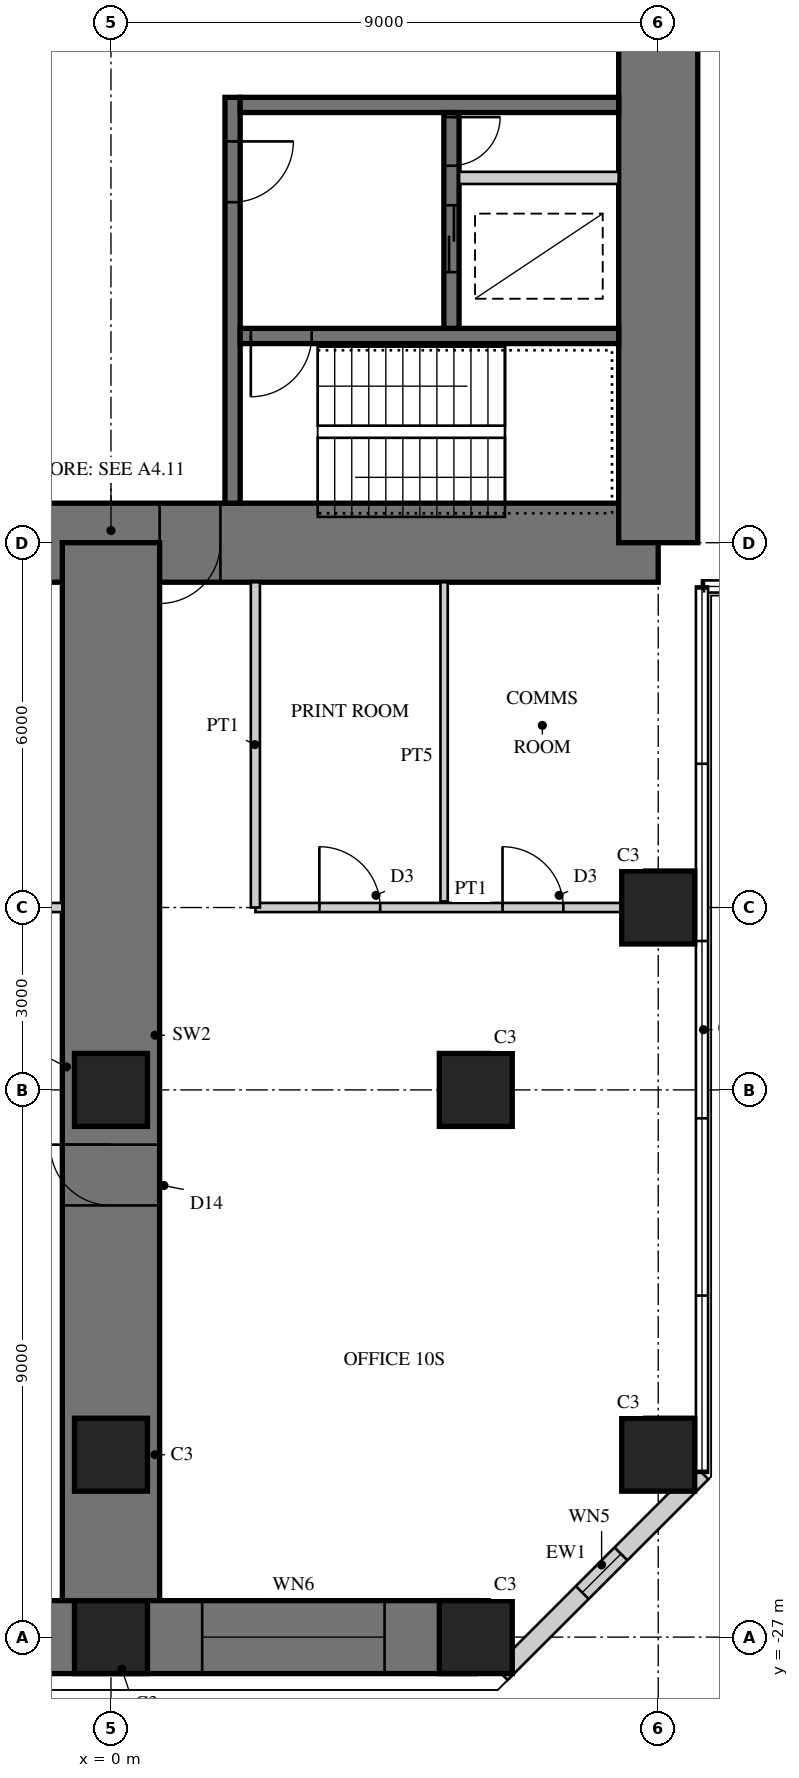
"""IFC4 building model, lengths in metres.
Left out: names, types, materials, properties, quantities, classifications, styles, units other than length and angle.
Written with IfcOpenShell. Run it as: python <this file> out.ifc"""

import sys

from ifc_helpers import new_model, si_unit, direction, frame, frame_2d, origin, origin_2d, place, context, subcontext, project, spatial, rectangle, hollow_rectangle, extrude, element, fill, save


model = new_model("IFC4")
c1 = context("Model", 3, precision=1e-05, world=origin(), true_north=direction((0.0, 1.0)))
c2 = subcontext(c1, "Body", "Model", "MODEL_VIEW")
j1 = project(units=[si_unit("LENGTHUNIT", "METRE"), si_unit("PLANEANGLEUNIT", "RADIAN")], contexts=[c1])
p1 = place(None, origin())
s1 = spatial("IfcSite", under=j1, at=p1, CompositionType="ELEMENT")
p2 = place(p1, origin())
s2 = spatial("IfcBuilding", under=s1, at=p2, CompositionType="ELEMENT")
p3 = place(p2, frame((0.0, 0.0, 43.5)))
s3 = spatial("IfcBuildingStorey", under=s2, at=p3, CompositionType="ELEMENT", Elevation=43.5)
p4 = place(p3, frame((-9.0, -9.0, 0.0), z_axis=(0.0, 0.0, 1.0), x_axis=(1.0, 0.0, 0.0)))
e1 = element("IfcWall", 1, at=p4, inside=s3, PredefinedType="SHEAR", context=c2, shape_type="SweptSolid", body=[
    extrude(rectangle(XDim=18.0, YDim=1.3, at=frame_2d((9.0, 0.0))), origin(), (0.0, 0.0, 1.0), 4.0),
])
p5 = place(p4, frame((9.8, 0.0, 0.0)))
e2 = element("IfcOpeningElement", 2, at=p5, cuts=e1, PredefinedType="OPENING", context=c2, shape_type="SweptSolid", body=[
    extrude(rectangle(XDim=1.0, YDim=2.4, at=frame_2d((0.5, 1.2))), frame((0.0, 0.66, 0.0), z_axis=(0.0, -1.0, 0.0), x_axis=(1.0, 0.0, 0.0)), (0.0, 0.0, 1.0), 1.32),
])
p6 = place(p3, frame((9.0, -9.0, 0.0), z_axis=(0.0, 0.0, 1.0), x_axis=(0.0, 1.0, 0.0)))
e3 = element("IfcWall", 3, at=p6, inside=s3, PredefinedType="SHEAR", context=c2, shape_type="SweptSolid", body=[
    extrude(rectangle(XDim=18.0, YDim=1.3, at=frame_2d((9.0, 0.0))), origin(), (0.0, 0.0, 1.0), 4.0),
])
p7 = place(p6, frame((9.8, 0.0, 0.0)))
e4 = element("IfcOpeningElement", 4, at=p7, cuts=e3, PredefinedType="OPENING", context=c2, shape_type="SweptSolid", body=[
    extrude(rectangle(XDim=1.0, YDim=2.4, at=frame_2d((0.5, 1.2))), frame((0.0, 0.66, 0.0), z_axis=(0.0, -1.0, 0.0), x_axis=(1.0, 0.0, 0.0)), (0.0, 0.0, 1.0), 1.32),
])
p8 = place(p3, frame((2.0, -1.675, 0.0), z_axis=(0.0, 0.0, 1.0), x_axis=(0.0, -1.0, 0.0)))
e5 = element("IfcWall", 5, at=p8, inside=s3, PredefinedType="SHEAR", context=c2, shape_type="SweptSolid", body=[
    extrude(rectangle(XDim=6.675, YDim=0.25, at=frame_2d((3.337, 0.0))), origin(), (0.0, 0.0, 1.0), 4.0),
])
p9 = place(p8, frame((0.725, 0.0, 0.0)))
e6 = element("IfcOpeningElement", 6, at=p9, cuts=e5, PredefinedType="OPENING", context=c2, shape_type="SweptSolid", body=[
    extrude(rectangle(XDim=1.0, YDim=2.1, at=frame_2d((0.5, 1.05))), frame((0.0, 0.135, 0.0), z_axis=(0.0, -1.0, 0.0), x_axis=(1.0, 0.0, 0.0)), (0.0, 0.0, 1.0), 0.27),
])
p10 = place(p3, frame((2.125, -1.8, 0.0), z_axis=(0.0, 0.0, 1.0), x_axis=(1.0, 0.0, 0.0)))
e7 = element("IfcWall", 7, at=p10, inside=s3, PredefinedType="SHEAR", context=c2, shape_type="SweptSolid", body=[
    extrude(rectangle(XDim=6.225, YDim=0.25, at=frame_2d((3.113, 0.0))), origin(), (0.0, 0.0, 1.0), 4.0),
])
p11 = place(p3, frame((2.125, -5.6, 0.0), z_axis=(0.0, 0.0, 1.0), x_axis=(1.0, 0.0, 0.0)))
e8 = element("IfcWall", 8, at=p11, inside=s3, PredefinedType="SHEAR", context=c2, shape_type="SweptSolid", body=[
    extrude(rectangle(XDim=6.225, YDim=0.25, at=frame_2d((3.113, 0.0))), origin(), (0.0, 0.0, 1.0), 4.0),
])
p12 = place(p11, frame((0.175, 0.0, 0.0)))
e9 = element("IfcOpeningElement", 9, at=p12, cuts=e8, PredefinedType="OPENING", context=c2, shape_type="SweptSolid", body=[
    extrude(rectangle(XDim=1.0, YDim=2.1, at=frame_2d((0.5, 1.05))), frame((0.0, 0.135, 0.0), z_axis=(0.0, -1.0, 0.0), x_axis=(1.0, 0.0, 0.0)), (0.0, 0.0, 1.0), 0.27),
])
p13 = place(p3, frame((5.6, -1.925, 0.0), z_axis=(0.0, 0.0, 1.0), x_axis=(0.0, -1.0, 0.0)))
e10 = element("IfcWall", 10, at=p13, inside=s3, PredefinedType="SHEAR", context=c2, shape_type="SweptSolid", body=[
    extrude(rectangle(XDim=3.55, YDim=0.25, at=frame_2d((1.775, 0.0))), origin(), (0.0, 0.0, 1.0), 4.0),
])
p14 = place(p13, frame((1.525, 0.0, 0.0)))
e11 = element("IfcOpeningElement", 11, at=p14, cuts=e10, PredefinedType="OPENING", context=c2, shape_type="SweptSolid", body=[
    extrude(rectangle(XDim=1.1, YDim=2.2, at=frame_2d((0.55, 1.1))), frame((0.0, 0.135, 0.0), z_axis=(0.0, -1.0, 0.0), x_axis=(1.0, 0.0, 0.0)), (0.0, 0.0, 1.0), 0.27),
])
p15 = place(p13, frame((0.075, 0.0, 0.0)))
e12 = element("IfcOpeningElement", 12, at=p15, cuts=e10, PredefinedType="OPENING", context=c2, shape_type="SweptSolid", body=[
    extrude(rectangle(XDim=0.8, YDim=2.1, at=frame_2d((0.4, 1.05))), frame((0.0, 0.135, 0.0), z_axis=(0.0, -1.0, 0.0), x_axis=(1.0, 0.0, 0.0)), (0.0, 0.0, 1.0), 0.27),
])
p16 = place(p3, frame((5.725, -3.0, 0.0), z_axis=(0.0, 0.0, 1.0), x_axis=(1.0, 0.0, 0.0)))
e13 = element("IfcWall", 13, at=p16, inside=s3, PredefinedType="PARTITIONING", context=c2, shape_type="SweptSolid", body=[
    extrude(rectangle(XDim=2.625, YDim=0.2, at=frame_2d((1.312, 0.0))), origin(), (0.0, 0.0, 1.0), 4.0),
])
p17 = place(p3, frame((0.0, -9.0, 0.0), z_axis=(0.0, 0.0, 1.0), x_axis=(0.0, -1.0, 0.0)))
e14 = element("IfcWall", 14, at=p17, inside=s3, PredefinedType="SHEAR", context=c2, shape_type="SweptSolid", body=[
    extrude(rectangle(XDim=18.0, YDim=1.6, at=frame_2d((9.0, 0.0))), origin(), (0.0, 0.0, 1.0), 4.0),
])
p18 = place(p17, frame((9.9, 0.0, 0.0)))
e15 = element("IfcOpeningElement", 15, at=p18, cuts=e14, PredefinedType="OPENING", context=c2, shape_type="SweptSolid", body=[
    extrude(rectangle(XDim=1.0, YDim=2.2, at=frame_2d((0.5, 1.1))), frame((0.0, 0.81, 0.0), z_axis=(0.0, -1.0, 0.0), x_axis=(1.0, 0.0, 0.0)), (0.0, 0.0, 1.0), 1.62),
])
p19 = place(p3, frame((-6.0, -27.0, 0.0), z_axis=(0.0, 0.0, 1.0), x_axis=(1.0, 0.0, 0.0)))
e16 = element("IfcWall", 16, at=p19, inside=s3, PredefinedType="SHEAR", context=c2, shape_type="SweptSolid", body=[
    extrude(rectangle(XDim=12.0, YDim=1.2, at=frame_2d((6.0, 0.0))), origin(), (0.0, 0.0, 1.0), 4.0),
])
p20 = place(p19, frame((1.5, 0.0, 0.6)))
e17 = element("IfcOpeningElement", 17, at=p20, cuts=e16, PredefinedType="OPENING", context=c2, shape_type="SweptSolid", body=[
    extrude(rectangle(XDim=3.0, YDim=2.4, at=frame_2d((1.5, 1.2))), frame((0.0, 0.61, 0.0), z_axis=(0.0, -1.0, 0.0), x_axis=(1.0, 0.0, 0.0)), (0.0, 0.0, 1.0), 1.22),
])
p21 = place(p19, frame((7.5, 0.0, 0.6)))
e18 = element("IfcOpeningElement", 18, at=p21, cuts=e16, PredefinedType="OPENING", context=c2, shape_type="SweptSolid", body=[
    extrude(rectangle(XDim=3.0, YDim=2.4, at=frame_2d((1.5, 1.2))), frame((0.0, 0.61, 0.0), z_axis=(0.0, -1.0, 0.0), x_axis=(1.0, 0.0, 0.0)), (0.0, 0.0, 1.0), 1.22),
])
for number, where, z_axis, x_axis in (
    (19, (9.0, -15.0, 0.0), (0.0, 0.0, 1.0), (1.0, 0.0, 0.0)),
    (20, (9.0, -24.0, 0.0), (0.0, 0.0, 1.0), (1.0, 0.0, 0.0)),
    (21, (0.0, -27.0, 0.0), (0.0, 0.0, 1.0), (1.0, 0.0, 0.0)),
    (22, (6.0, -27.0, 0.0), (0.0, 0.0, 1.0), (1.0, 0.0, 0.0)),
    (23, (0.0, -18.0, 0.0), (0.0, 0.0, 1.0), (1.0, 0.0, 0.0)),
    (24, (6.0, -18.0, 0.0), (0.0, 0.0, 1.0), (1.0, 0.0, 0.0)),
    (25, (0.0, -24.0, 0.0), (0.0, 0.0, 1.0), (1.0, 0.0, 0.0)),
):
    element("IfcColumn", number, at=place(p3, frame(where, z_axis=z_axis, x_axis=x_axis)), inside=s3, PredefinedType="COLUMN", context=c2, shape_type="SweptSolid", body=[
        extrude(rectangle(XDim=1.2, YDim=1.2, at=origin_2d()), origin(), (0.0, 0.0, 1.0), 4.0),
    ])
p22 = place(p3, frame((6.418, -27.6, 0.0), z_axis=(0.0, 0.0, 1.0), x_axis=(0.707106781187, 0.707106781187, 0.0)))
e26 = element("IfcWall", 26, at=p22, inside=s3, PredefinedType="SOLIDWALL", context=c2, shape_type="SweptSolid", body=[
    extrude(rectangle(XDim=4.669, YDim=0.3, at=frame_2d((2.335, 0.0))), origin(), (0.0, 0.0, 1.0), 3.8),
])
p23 = place(p22, frame((1.885, 0.0, 0.3)))
e27 = element("IfcOpeningElement", 27, at=p23, cuts=e26, PredefinedType="OPENING", context=c2, shape_type="SweptSolid", body=[
    extrude(rectangle(XDim=0.9, YDim=2.4, at=frame_2d((0.45, 1.2))), frame((0.0, 0.16, 0.0), z_axis=(0.0, -1.0, 0.0), x_axis=(1.0, 0.0, 0.0)), (0.0, 0.0, 1.0), 0.32),
])
p24 = place(p3, frame((2.375, -15.0, 0.0), z_axis=(0.0, 0.0, 1.0), x_axis=(1.0, 0.0, 0.0)))
e28 = element("IfcWall", 28, at=p24, inside=s3, PredefinedType="PARTITIONING", context=c2, shape_type="SweptSolid", body=[
    extrude(rectangle(XDim=6.025, YDim=0.15, at=frame_2d((3.012, 0.0))), origin(), (0.0, 0.0, 1.0), 2.95),
])
p25 = place(p24, frame((1.052, 0.0, 0.0)))
e29 = element("IfcOpeningElement", 29, at=p25, cuts=e28, PredefinedType="OPENING", context=c2, shape_type="SweptSolid", body=[
    extrude(rectangle(XDim=1.0, YDim=2.1, at=frame_2d((0.5, 1.05))), frame((0.0, 0.085, 0.0), z_axis=(0.0, -1.0, 0.0), x_axis=(1.0, 0.0, 0.0)), (0.0, 0.0, 1.0), 0.17),
])
p26 = place(p24, frame((4.064, 0.0, 0.0)))
e30 = element("IfcOpeningElement", 30, at=p26, cuts=e28, PredefinedType="OPENING", context=c2, shape_type="SweptSolid", body=[
    extrude(rectangle(XDim=1.0, YDim=2.1, at=frame_2d((0.5, 1.05))), frame((0.0, 0.085, 0.0), z_axis=(0.0, -1.0, 0.0), x_axis=(1.0, 0.0, 0.0)), (0.0, 0.0, 1.0), 0.17),
])
p27 = place(p3, frame((2.375, -9.65, 0.0), z_axis=(0.0, 0.0, 1.0), x_axis=(0.0, -1.0, 0.0)))
e31 = element("IfcWall", 31, at=p27, inside=s3, PredefinedType="PARTITIONING", context=c2, shape_type="SweptSolid", body=[
    extrude(rectangle(XDim=5.35, YDim=0.15, at=frame_2d((2.675, 0.0))), origin(), (0.0, 0.0, 1.0), 3.8),
])
p28 = place(p3, frame((5.479, -9.65, 0.0), z_axis=(0.0, 0.0, 1.0), x_axis=(0.0, -1.0, 0.0)))
e32 = element("IfcWall", 32, at=p28, inside=s3, PredefinedType="PLUMBINGWALL", context=c2, shape_type="SweptSolid", body=[
    extrude(rectangle(XDim=5.25, YDim=0.12, at=frame_2d((2.625, 0.0))), origin(), (0.0, 0.0, 1.0), 3.8),
])
p29 = place(p3, frame((-8.4, -15.0, 0.0), z_axis=(0.0, 0.0, 1.0), x_axis=(1.0, 0.0, 0.0)))
e33 = element("IfcWall", 33, at=p29, inside=s3, PredefinedType="PARTITIONING", context=c2, shape_type="SweptSolid", body=[
    extrude(rectangle(XDim=7.6, YDim=0.15, at=frame_2d((3.8, 0.0))), origin(), (0.0, 0.0, 1.0), 2.95),
])
p30 = place(p29, frame((1.375, 0.0, 0.0)))
e34 = element("IfcOpeningElement", 34, at=p30, cuts=e33, PredefinedType="OPENING", context=c2, shape_type="SweptSolid", body=[
    extrude(rectangle(XDim=1.0, YDim=2.1, at=frame_2d((0.5, 1.05))), frame((0.0, 0.085, 0.0), z_axis=(0.0, -1.0, 0.0), x_axis=(1.0, 0.0, 0.0)), (0.0, 0.0, 1.0), 0.17),
])
p31 = place(p29, frame((5.175, 0.0, 0.0)))
e35 = element("IfcOpeningElement", 35, at=p31, cuts=e33, PredefinedType="OPENING", context=c2, shape_type="SweptSolid", body=[
    extrude(rectangle(XDim=1.0, YDim=2.1, at=frame_2d((0.5, 1.05))), frame((0.0, 0.085, 0.0), z_axis=(0.0, -1.0, 0.0), x_axis=(1.0, 0.0, 0.0)), (0.0, 0.0, 1.0), 0.17),
])
p32 = place(p21, origin())
e36 = element("IfcWindow", 36, at=p32, inside=s3, PartitioningType="SINGLE_PANEL", PredefinedType="WINDOW", context=c2, shape_type="SweptSolid", body=[
    extrude(hollow_rectangle(XDim=3.0, YDim=2.4, WallThickness=0.06, at=frame_2d((1.5, 1.2))), frame((0.0, 0.03, 0.0), z_axis=(0.0, -1.0, 0.0), x_axis=(1.0, 0.0, 0.0)), (0.0, 0.0, 1.0), 0.06),
    extrude(rectangle(XDim=2.879, YDim=2.279, at=frame_2d((1.5, 1.2))), frame((0.0, 0.03, 0.0), z_axis=(0.0, -1.0, 0.0), x_axis=(1.0, 0.0, 0.0)), (0.0, 0.0, 1.0), 0.06),
])
fill(e18, e36)
p33 = place(p23, origin())
e37 = element("IfcWindow", 37, at=p33, inside=s3, PartitioningType="SINGLE_PANEL", PredefinedType="WINDOW", context=c2, shape_type="SweptSolid", body=[
    extrude(hollow_rectangle(XDim=0.9, YDim=2.4, WallThickness=0.06, at=frame_2d((0.45, 1.2))), frame((0.0, 0.03, 0.0), z_axis=(0.0, -1.0, 0.0), x_axis=(1.0, 0.0, 0.0)), (0.0, 0.0, 1.0), 0.06),
    extrude(rectangle(XDim=0.779, YDim=2.279, at=frame_2d((0.45, 1.2))), frame((0.0, 0.03, 0.0), z_axis=(0.0, -1.0, 0.0), x_axis=(1.0, 0.0, 0.0)), (0.0, 0.0, 1.0), 0.06),
])
fill(e27, e37)
p34 = place(p25, origin())
e38 = element("IfcDoor", 38, at=p34, inside=s3, OperationType="SINGLE_SWING_LEFT", PredefinedType="DOOR", context=c2, shape_type="SweptSolid", body=[
    extrude(rectangle(XDim=1.0, YDim=2.1, at=frame_2d((0.5, 1.05))), frame((0.0, 0.025, 0.0), z_axis=(0.0, -1.0, 0.0), x_axis=(1.0, 0.0, 0.0)), (0.0, 0.0, 1.0), 0.05),
])
fill(e29, e38)
p35 = place(p26, origin())
e39 = element("IfcDoor", 39, at=p35, inside=s3, OperationType="SINGLE_SWING_LEFT", PredefinedType="DOOR", context=c2, shape_type="SweptSolid", body=[
    extrude(rectangle(XDim=1.0, YDim=2.1, at=frame_2d((0.5, 1.05))), frame((0.0, 0.025, 0.0), z_axis=(0.0, -1.0, 0.0), x_axis=(1.0, 0.0, 0.0)), (0.0, 0.0, 1.0), 0.05),
])
fill(e30, e39)
p36 = place(p18, frame((1.0, 0.0, 0.0), z_axis=(0.0, 0.0, 1.0), x_axis=(-1.0, 0.0, 0.0)))
e40 = element("IfcDoor", 40, at=p36, inside=s3, OperationType="SINGLE_SWING_RIGHT", PredefinedType="DOOR", context=c2, shape_type="SweptSolid", body=[
    extrude(rectangle(XDim=1.0, YDim=2.2, at=frame_2d((0.5, 1.1))), frame((0.0, 0.025, 0.0), z_axis=(0.0, -1.0, 0.0), x_axis=(1.0, 0.0, 0.0)), (0.0, 0.0, 1.0), 0.05),
])
fill(e15, e40)
p37 = place(p5, frame((1.0, 0.0, 0.0), z_axis=(0.0, 0.0, 1.0), x_axis=(-1.0, 0.0, 0.0)))
e41 = element("IfcDoor", 41, at=p37, inside=s3, OperationType="SINGLE_SWING_RIGHT", PredefinedType="DOOR", context=c2, shape_type="SweptSolid", body=[
    extrude(rectangle(XDim=1.0, YDim=2.4, at=frame_2d((0.5, 1.2))), frame((0.0, -0.005, 0.0), z_axis=(0.0, -1.0, 0.0), x_axis=(1.0, 0.0, 0.0)), (0.0, 0.0, 1.0), 0.05),
])
fill(e2, e41)
p38 = place(p9, origin())
e42 = element("IfcDoor", 42, at=p38, inside=s3, OperationType="SINGLE_SWING_LEFT", PredefinedType="DOOR", context=c2, shape_type="SweptSolid", body=[
    extrude(rectangle(XDim=1.0, YDim=2.1, at=frame_2d((0.5, 1.05))), frame((0.0, 0.025, 0.0), z_axis=(0.0, -1.0, 0.0), x_axis=(1.0, 0.0, 0.0)), (0.0, 0.0, 1.0), 0.05),
])
fill(e6, e42)
p39 = place(p12, frame((1.0, 0.0, 0.0), z_axis=(0.0, 0.0, 1.0), x_axis=(-1.0, 0.0, 0.0)))
e43 = element("IfcDoor", 43, at=p39, inside=s3, OperationType="SINGLE_SWING_RIGHT", PredefinedType="DOOR", context=c2, shape_type="SweptSolid", body=[
    extrude(rectangle(XDim=1.0, YDim=2.1, at=frame_2d((0.5, 1.05))), frame((0.0, 0.025, 0.0), z_axis=(0.0, -1.0, 0.0), x_axis=(1.0, 0.0, 0.0)), (0.0, 0.0, 1.0), 0.05),
])
fill(e9, e43)
p40 = place(p14, origin())
e44 = element("IfcDoor", 44, at=p40, inside=s3, OperationType="DOUBLE_DOOR_SLIDING", PredefinedType="DOOR", context=c2, shape_type="SweptSolid", body=[
    extrude(rectangle(XDim=1.1, YDim=2.2, at=frame_2d((0.55, 1.1))), frame((0.0, 0.025, 0.0), z_axis=(0.0, -1.0, 0.0), x_axis=(1.0, 0.0, 0.0)), (0.0, 0.0, 1.0), 0.05),
])
fill(e11, e44)
p41 = place(p15, origin())
e45 = element("IfcDoor", 45, at=p41, inside=s3, OperationType="SINGLE_SWING_LEFT", PredefinedType="DOOR", context=c2, shape_type="SweptSolid", body=[
    extrude(rectangle(XDim=0.8, YDim=2.1, at=frame_2d((0.4, 1.05))), frame((0.0, 0.025, 0.0), z_axis=(0.0, -1.0, 0.0), x_axis=(1.0, 0.0, 0.0)), (0.0, 0.0, 1.0), 0.05),
])
fill(e12, e45)
save(model, sys.argv[1])
